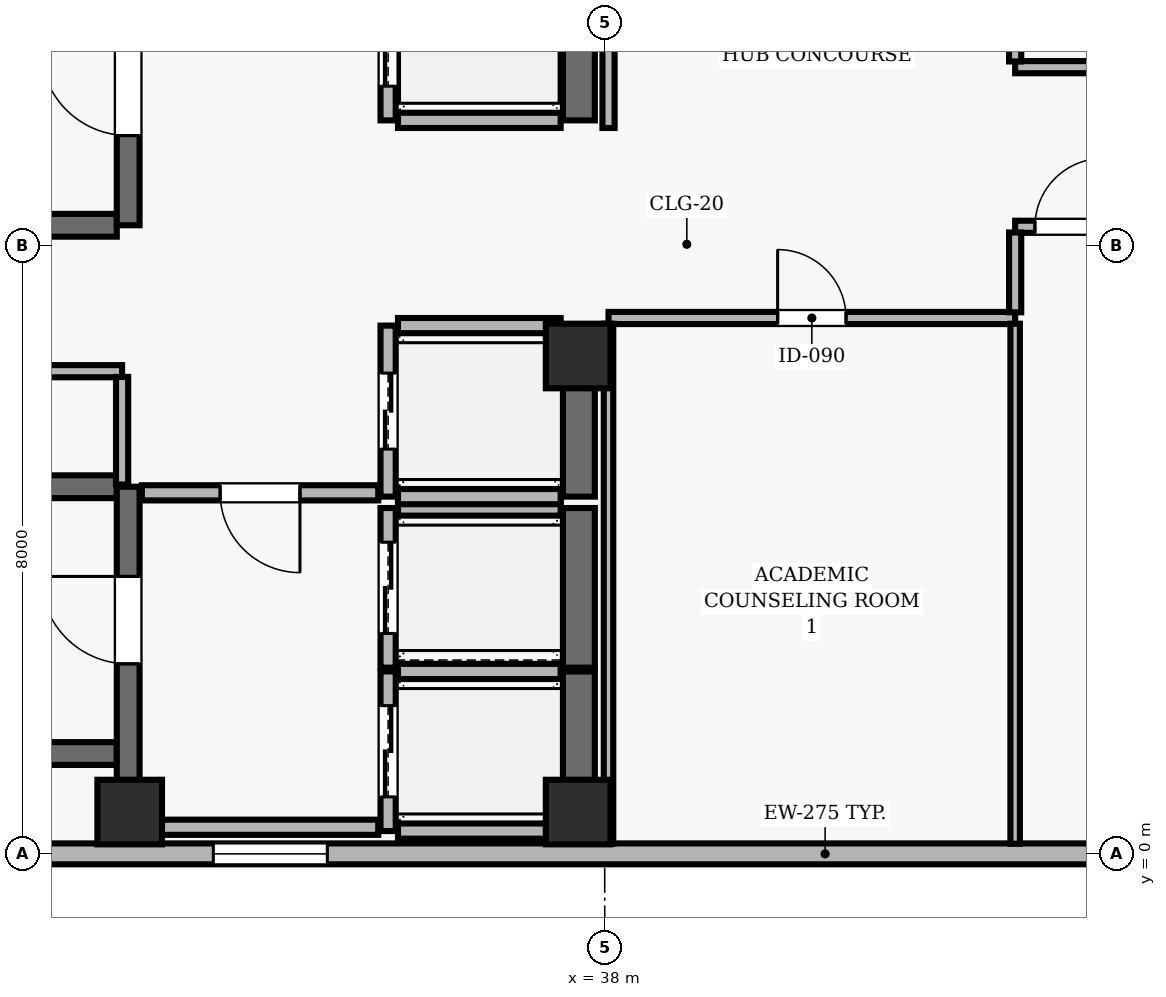
"""IFC4 building model, lengths in metres.
Left out: names, types, materials, properties, quantities, classifications, styles, units other than length and angle.
Written with IfcOpenShell. Run it as: python <this file> out.ifc"""

import sys

from ifc_helpers import new_model, si_unit, direction, frame, frame_2d, origin, origin_2d, place, context, subcontext, project, spatial, rectangle, extrude, element, fill, save


model = new_model("IFC4")
c1 = context("Model", 3, precision=1e-05, world=origin(), true_north=direction((0.0, 1.0)))
c2 = subcontext(c1, "Body", "Model", "MODEL_VIEW")
j1 = project(units=[si_unit("LENGTHUNIT", "METRE"), si_unit("PLANEANGLEUNIT", "RADIAN")], contexts=[c1])
p1 = place(None, origin())
s1 = spatial("IfcSite", under=j1, at=p1, CompositionType="ELEMENT")
p2 = place(p1, origin())
s2 = spatial("IfcBuilding", under=s1, at=p2, CompositionType="ELEMENT")
p3 = place(p2, frame((0.0, 0.0, 298.9)))
s3 = spatial("IfcBuildingStorey", under=s2, at=p3, CompositionType="ELEMENT", Elevation=298.9)
for number, where, z_axis, x_axis in (
    (1, (31.75, 0.55, 0.0), (0.0, 0.0, 1.0), (1.0, 0.0, 0.0)),
    (2, (37.65, 0.55, 0.0), (0.0, 0.0, 1.0), (1.0, 0.0, 0.0)),
    (3, (37.65, 6.55, 0.0), (0.0, 0.0, 1.0), (1.0, 0.0, 0.0)),
):
    element("IfcColumn", number, at=place(p3, frame(where, z_axis=z_axis, x_axis=x_axis)), inside=s3, PredefinedType="COLUMN", context=c2, shape_type="SweptSolid", body=[
        extrude(rectangle(XDim=0.85, YDim=0.85, at=origin_2d()), origin(), (0.0, 0.0, 1.0), 3.9),
    ])
p4 = place(p3, frame((24.5, 0.0, 0.0), z_axis=(0.0, 0.0, 1.0), x_axis=(1.0, 0.0, 0.0)))
e4 = element("IfcWall", 4, at=p4, inside=s3, PredefinedType="SOLIDWALL", context=c2, shape_type="SweptSolid", body=[
    extrude(rectangle(XDim=32.8, YDim=0.275, at=frame_2d((16.4, 0.0))), origin(), (0.0, 0.0, 1.0), 3.69),
])
p5 = place(p4, frame((1.983, 0.0, 0.9)))
e5 = element("IfcOpeningElement", 5, at=p5, cuts=e4, PredefinedType="OPENING", context=c2, shape_type="SweptSolid", body=[
    extrude(rectangle(XDim=1.5, YDim=1.6, at=frame_2d((0.75, 0.8))), frame((0.0, 0.147, 0.0), z_axis=(0.0, -1.0, 0.0), x_axis=(1.0, 0.0, 0.0)), (0.0, 0.0, 1.0), 0.295),
])
p6 = place(p4, frame((8.35, 0.0, 0.9)))
e6 = element("IfcOpeningElement", 6, at=p6, cuts=e4, PredefinedType="OPENING", context=c2, shape_type="SweptSolid", body=[
    extrude(rectangle(XDim=1.5, YDim=1.6, at=frame_2d((0.75, 0.8))), frame((0.0, 0.147, 0.0), z_axis=(0.0, -1.0, 0.0), x_axis=(1.0, 0.0, 0.0)), (0.0, 0.0, 1.0), 0.295),
])
p7 = place(p4, frame((24.75, 0.0, 0.9)))
e7 = element("IfcOpeningElement", 7, at=p7, cuts=e4, PredefinedType="OPENING", context=c2, shape_type="SweptSolid", body=[
    extrude(rectangle(XDim=1.5, YDim=1.6, at=frame_2d((0.75, 0.8))), frame((0.0, 0.147, 0.0), z_axis=(0.0, -1.0, 0.0), x_axis=(1.0, 0.0, 0.0)), (0.0, 0.0, 1.0), 0.295),
])
p8 = place(p4, frame((30.217, 0.0, 0.9)))
e8 = element("IfcOpeningElement", 8, at=p8, cuts=e4, PredefinedType="OPENING", context=c2, shape_type="SweptSolid", body=[
    extrude(rectangle(XDim=1.5, YDim=1.6, at=frame_2d((0.75, 0.8))), frame((0.0, 0.147, 0.0), z_axis=(0.0, -1.0, 0.0), x_axis=(1.0, 0.0, 0.0)), (0.0, 0.0, 1.0), 0.295),
])
for number, where, z_axis, x_axis in (
    (9, (31.58, 4.83, 0.0), (0.0, 0.0, 1.0), (-1.0, 0.0, 0.0)),
    (10, (23.22, 1.32, 0.0), (0.0, 0.0, 1.0), (1.0, 0.0, 0.0)),
):
    element("IfcWall", number, at=place(p3, frame(where, z_axis=z_axis, x_axis=x_axis)), inside=s3, PredefinedType="SHEAR", context=c2, shape_type="SweptSolid", body=[
        extrude(rectangle(XDim=8.36, YDim=0.3, at=frame_2d((4.18, 0.0))), origin(), (0.0, 0.0, 1.0), 3.69),
    ])
p9 = place(p3, frame((31.73, 0.96, 0.0), z_axis=(0.0, 0.0, 1.0), x_axis=(0.0, 1.0, 0.0)))
e11 = element("IfcWall", 11, at=p9, inside=s3, PredefinedType="SHEAR", context=c2, shape_type="SweptSolid", body=[
    extrude(rectangle(XDim=3.87, YDim=0.3, at=frame_2d((1.935, 0.0))), origin(), (0.0, 0.0, 1.0), 3.69),
])
p10 = place(p9, frame((1.54, 0.0, 0.0)))
e12 = element("IfcOpeningElement", 12, at=p10, cuts=e11, PredefinedType="OPENING", context=c2, shape_type="SweptSolid", body=[
    extrude(rectangle(XDim=1.15, YDim=2.15, at=frame_2d((0.575, 1.075))), frame((0.0, 0.16, 0.0), z_axis=(0.0, -1.0, 0.0), x_axis=(1.0, 0.0, 0.0)), (0.0, 0.0, 1.0), 0.32),
])
p11 = place(p3, frame((23.22, 8.27, 0.0), z_axis=(0.0, 0.0, 1.0), x_axis=(1.0, 0.0, 0.0)))
e13 = element("IfcWall", 13, at=p11, inside=s3, PredefinedType="SHEAR", context=c2, shape_type="SweptSolid", body=[
    extrude(rectangle(XDim=8.36, YDim=0.3, at=frame_2d((4.18, 0.0))), origin(), (0.0, 0.0, 1.0), 3.69),
])
p12 = place(p3, frame((31.73, 8.27, 0.0), z_axis=(0.0, 0.0, 1.0), x_axis=(0.0, 1.0, 0.0)))
e14 = element("IfcWall", 14, at=p12, inside=s3, PredefinedType="SHEAR", context=c2, shape_type="SweptSolid", body=[
    extrude(rectangle(XDim=3.51, YDim=0.3, at=frame_2d((1.755, 0.0))), origin(), (0.0, 0.0, 1.0), 3.69),
])
p13 = place(p12, frame((1.18, 0.0, 0.0)))
e15 = element("IfcOpeningElement", 15, at=p13, cuts=e14, PredefinedType="OPENING", context=c2, shape_type="SweptSolid", body=[
    extrude(rectangle(XDim=1.15, YDim=2.15, at=frame_2d((0.575, 1.075))), frame((0.0, 0.16, 0.0), z_axis=(0.0, -1.0, 0.0), x_axis=(1.0, 0.0, 0.0)), (0.0, 0.0, 1.0), 0.32),
])
p14 = place(p3, frame((35.15, 2.4, 0.0), z_axis=(0.0, 0.0, 1.0), x_axis=(0.0, -1.0, 0.0)))
e16 = element("IfcWall", 16, at=p14, inside=s3, PredefinedType="SOLIDWALL", context=c2, shape_type="SweptSolid", body=[
    extrude(rectangle(XDim=2.1, YDim=0.2, at=frame_2d((1.05, 0.0))), origin(), (0.0, 0.0, 1.0), 3.69),
])
p15 = place(p14, frame((0.45, 0.0, 0.0)))
e17 = element("IfcOpeningElement", 17, at=p15, cuts=e16, PredefinedType="OPENING", context=c2, shape_type="SweptSolid", body=[
    extrude(rectangle(XDim=1.2, YDim=2.15, at=frame_2d((0.6, 1.075))), frame((0.0, 0.11, 0.0), z_axis=(0.0, -1.0, 0.0), x_axis=(1.0, 0.0, 0.0)), (0.0, 0.0, 1.0), 0.22),
])
p16 = place(p3, frame((37.66, 0.3, 0.0), z_axis=(0.0, 0.0, 1.0), x_axis=(0.0, 1.0, 0.0)))
e18 = element("IfcWall", 18, at=p16, inside=s3, PredefinedType="SHEAR", context=c2, shape_type="SweptSolid", body=[
    extrude(rectangle(XDim=2.1, YDim=0.42, at=frame_2d((1.05, 0.0))), origin(), (0.0, 0.0, 1.0), 3.69),
])
for number, where, z_axis, x_axis in (
    (19, (35.28, 0.3, 0.0), (0.0, 0.0, 1.0), (1.0, 0.0, 0.0)),
    (20, (37.42, 2.4, 0.0), (0.0, 0.0, 1.0), (-1.0, 0.0, 0.0)),
):
    element("IfcWall", number, at=place(p3, frame(where, z_axis=z_axis, x_axis=x_axis)), inside=s3, PredefinedType="SOLIDWALL", context=c2, shape_type="SweptSolid", body=[
        extrude(rectangle(XDim=2.14, YDim=0.2, at=frame_2d((1.07, 0.0))), origin(), (0.0, 0.0, 1.0), 3.69),
    ])
p17 = place(p3, frame((35.15, 4.55, 0.0), z_axis=(0.0, 0.0, 1.0), x_axis=(0.0, -1.0, 0.0)))
e21 = element("IfcWall", 21, at=p17, inside=s3, PredefinedType="SOLIDWALL", context=c2, shape_type="SweptSolid", body=[
    extrude(rectangle(XDim=2.1, YDim=0.2, at=frame_2d((1.05, 0.0))), origin(), (0.0, 0.0, 1.0), 3.69),
])
p18 = place(p17, frame((0.45, 0.0, 0.0)))
e22 = element("IfcOpeningElement", 22, at=p18, cuts=e21, PredefinedType="OPENING", context=c2, shape_type="SweptSolid", body=[
    extrude(rectangle(XDim=1.2, YDim=2.15, at=frame_2d((0.6, 1.075))), frame((0.0, 0.11, 0.0), z_axis=(0.0, -1.0, 0.0), x_axis=(1.0, 0.0, 0.0)), (0.0, 0.0, 1.0), 0.22),
])
p19 = place(p3, frame((37.66, 2.45, 0.0), z_axis=(0.0, 0.0, 1.0), x_axis=(0.0, 1.0, 0.0)))
e23 = element("IfcWall", 23, at=p19, inside=s3, PredefinedType="SHEAR", context=c2, shape_type="SweptSolid", body=[
    extrude(rectangle(XDim=2.1, YDim=0.42, at=frame_2d((1.05, 0.0))), origin(), (0.0, 0.0, 1.0), 3.69),
])
p20 = place(p3, frame((37.42, 4.55, 0.0), z_axis=(0.0, 0.0, 1.0), x_axis=(-1.0, 0.0, 0.0)))
e24 = element("IfcWall", 24, at=p20, inside=s3, PredefinedType="SOLIDWALL", context=c2, shape_type="SweptSolid", body=[
    extrude(rectangle(XDim=2.14, YDim=0.2, at=frame_2d((1.07, 0.0))), origin(), (0.0, 0.0, 1.0), 3.69),
])
p21 = place(p3, frame((35.15, 6.95, 0.0), z_axis=(0.0, 0.0, 1.0), x_axis=(0.0, -1.0, 0.0)))
e25 = element("IfcWall", 25, at=p21, inside=s3, PredefinedType="SOLIDWALL", context=c2, shape_type="SweptSolid", body=[
    extrude(rectangle(XDim=2.25, YDim=0.2, at=frame_2d((1.125, 0.0))), origin(), (0.0, 0.0, 1.0), 3.69),
])
p22 = place(p21, frame((0.625, 0.0, 0.0)))
e26 = element("IfcOpeningElement", 26, at=p22, cuts=e25, PredefinedType="OPENING", context=c2, shape_type="SweptSolid", body=[
    extrude(rectangle(XDim=1.0, YDim=2.1, at=frame_2d((0.5, 1.05))), frame((0.0, 0.11, 0.0), z_axis=(0.0, -1.0, 0.0), x_axis=(1.0, 0.0, 0.0)), (0.0, 0.0, 1.0), 0.22),
])
p23 = place(p3, frame((37.66, 4.7, 0.0), z_axis=(0.0, 0.0, 1.0), x_axis=(0.0, 1.0, 0.0)))
e27 = element("IfcWall", 27, at=p23, inside=s3, PredefinedType="SHEAR", context=c2, shape_type="SweptSolid", body=[
    extrude(rectangle(XDim=2.25, YDim=0.42, at=frame_2d((1.125, 0.0))), origin(), (0.0, 0.0, 1.0), 3.69),
])
for number, where, z_axis, x_axis in (
    (28, (35.28, 4.7, 0.0), (0.0, 0.0, 1.0), (1.0, 0.0, 0.0)),
    (29, (37.42, 6.95, 0.0), (0.0, 0.0, 1.0), (-1.0, 0.0, 0.0)),
):
    element("IfcWall", number, at=place(p3, frame(where, z_axis=z_axis, x_axis=x_axis)), inside=s3, PredefinedType="SOLIDWALL", context=c2, shape_type="SweptSolid", body=[
        extrude(rectangle(XDim=2.14, YDim=0.2, at=frame_2d((1.07, 0.0))), origin(), (0.0, 0.0, 1.0), 3.69),
    ])
p24 = place(p3, frame((35.15, 11.55, 0.0), z_axis=(0.0, 0.0, 1.0), x_axis=(0.0, -1.0, 0.0)))
e30 = element("IfcWall", 30, at=p24, inside=s3, PredefinedType="SOLIDWALL", context=c2, shape_type="SweptSolid", body=[
    extrude(rectangle(XDim=1.9, YDim=0.2, at=frame_2d((0.95, 0.0))), origin(), (0.0, 0.0, 1.0), 3.69),
])
p25 = place(p24, frame((0.45, 0.0, 0.0)))
e31 = element("IfcOpeningElement", 31, at=p25, cuts=e30, PredefinedType="OPENING", context=c2, shape_type="SweptSolid", body=[
    extrude(rectangle(XDim=1.0, YDim=2.1, at=frame_2d((0.5, 1.05))), frame((0.0, 0.11, 0.0), z_axis=(0.0, -1.0, 0.0), x_axis=(1.0, 0.0, 0.0)), (0.0, 0.0, 1.0), 0.22),
])
p26 = place(p3, frame((37.66, 9.65, 0.0), z_axis=(0.0, 0.0, 1.0), x_axis=(0.0, 1.0, 0.0)))
e32 = element("IfcWall", 32, at=p26, inside=s3, PredefinedType="SHEAR", context=c2, shape_type="SweptSolid", body=[
    extrude(rectangle(XDim=1.9, YDim=0.42, at=frame_2d((0.95, 0.0))), origin(), (0.0, 0.0, 1.0), 3.69),
])
p27 = place(p3, frame((35.28, 9.65, 0.0), z_axis=(0.0, 0.0, 1.0), x_axis=(1.0, 0.0, 0.0)))
e33 = element("IfcWall", 33, at=p27, inside=s3, PredefinedType="SOLIDWALL", context=c2, shape_type="SweptSolid", body=[
    extrude(rectangle(XDim=2.14, YDim=0.2, at=frame_2d((1.07, 0.0))), origin(), (0.0, 0.0, 1.0), 3.69),
])
p28 = place(p3, frame((28.85, 6.35, 0.0), z_axis=(0.0, 0.0, 1.0), x_axis=(1.0, 0.0, 0.0)))
e34 = element("IfcWall", 34, at=p28, inside=s3, PredefinedType="PARTITIONING", context=c2, shape_type="SweptSolid", body=[
    extrude(rectangle(XDim=2.8, YDim=0.16, at=frame_2d((1.4, 0.0))), origin(), (0.0, 0.0, 1.0), 3.69),
])
p29 = place(p28, frame((0.96, 0.0, 0.0)))
e35 = element("IfcOpeningElement", 35, at=p29, cuts=e34, PredefinedType="OPENING", context=c2, shape_type="SweptSolid", body=[
    extrude(rectangle(XDim=0.88, YDim=2.1, at=frame_2d((0.44, 1.05))), frame((0.0, 0.09, 0.0), z_axis=(0.0, -1.0, 0.0), x_axis=(1.0, 0.0, 0.0)), (0.0, 0.0, 1.0), 0.18),
])
p30 = place(p3, frame((31.65, 0.35, 0.0), z_axis=(0.0, 0.0, 1.0), x_axis=(1.0, 0.0, 0.0)))
e36 = element("IfcWall", 36, at=p30, inside=s3, PredefinedType="SOLIDWALL", context=c2, shape_type="SweptSolid", body=[
    extrude(rectangle(XDim=3.37, YDim=0.2, at=frame_2d((1.685, 0.0))), origin(), (0.0, 0.0, 1.0), 3.69),
])
p31 = place(p3, frame((35.02, 4.75, 0.0), z_axis=(0.0, 0.0, 1.0), x_axis=(-1.0, 0.0, 0.0)))
e37 = element("IfcWall", 37, at=p31, inside=s3, PredefinedType="SOLIDWALL", context=c2, shape_type="SweptSolid", body=[
    extrude(rectangle(XDim=3.11, YDim=0.2, at=frame_2d((1.555, 0.0))), origin(), (0.0, 0.0, 1.0), 3.69),
])
p32 = place(p31, frame((1.03, 0.0, 0.0)))
e38 = element("IfcOpeningElement", 38, at=p32, cuts=e37, PredefinedType="OPENING", context=c2, shape_type="SweptSolid", body=[
    extrude(rectangle(XDim=1.05, YDim=2.15, at=frame_2d((0.525, 1.075))), frame((0.0, 0.11, 0.0), z_axis=(0.0, -1.0, 0.0), x_axis=(1.0, 0.0, 0.0)), (0.0, 0.0, 1.0), 0.22),
])
p33 = place(p3, frame((38.05, 7.05, 0.0), z_axis=(0.0, 0.0, 1.0), x_axis=(1.0, 0.0, 0.0)))
e39 = element("IfcWall", 39, at=p33, inside=s3, PredefinedType="PARTITIONING", context=c2, shape_type="SweptSolid", body=[
    extrude(rectangle(XDim=5.35, YDim=0.16, at=frame_2d((2.675, 0.0))), origin(), (0.0, 0.0, 1.0), 3.69),
])
p34 = place(p33, frame((2.225, 0.0, 0.0)))
e40 = element("IfcOpeningElement", 40, at=p34, cuts=e39, PredefinedType="OPENING", context=c2, shape_type="SweptSolid", body=[
    extrude(rectangle(XDim=0.9, YDim=2.1, at=frame_2d((0.45, 1.05))), frame((0.0, 0.09, 0.0), z_axis=(0.0, -1.0, 0.0), x_axis=(1.0, 0.0, 0.0)), (0.0, 0.0, 1.0), 0.18),
])
p35 = place(p3, frame((43.4, 8.25, 0.0), z_axis=(0.0, 0.0, 1.0), x_axis=(1.0, 0.0, 0.0)))
e41 = element("IfcWall", 41, at=p35, inside=s3, PredefinedType="PARTITIONING", context=c2, shape_type="SweptSolid", body=[
    extrude(rectangle(XDim=4.92, YDim=0.16, at=frame_2d((2.46, 0.0))), origin(), (0.0, 0.0, 1.0), 3.227),
])
p36 = place(p35, frame((0.26, 0.0, 0.0)))
e42 = element("IfcOpeningElement", 42, at=p36, cuts=e41, PredefinedType="OPENING", context=c2, shape_type="SweptSolid", body=[
    extrude(rectangle(XDim=0.9, YDim=2.1, at=frame_2d((0.45, 1.05))), frame((0.0, 0.09, 0.0), z_axis=(0.0, -1.0, 0.0), x_axis=(1.0, 0.0, 0.0)), (0.0, 0.0, 1.0), 0.18),
])
p37 = place(p3, frame((48.32, 10.35, 0.0), z_axis=(0.0, 0.0, 1.0), x_axis=(-1.0, 0.0, 0.0)))
e43 = element("IfcWall", 43, at=p37, inside=s3, PredefinedType="PARTITIONING", context=c2, shape_type="SweptSolid", body=[
    extrude(rectangle(XDim=4.92, YDim=0.16, at=frame_2d((2.46, 0.0))), origin(), (0.0, 0.0, 1.0), 3.424),
])
p38 = place(p3, frame((31.65, 4.86, 0.0), z_axis=(0.0, 0.0, 1.0), x_axis=(0.0, 1.0, 0.0)))
e44 = element("IfcWall", 44, at=p38, inside=s3, PredefinedType="PARTITIONING", context=c2, shape_type="SweptSolid", body=[
    extrude(rectangle(XDim=1.415, YDim=0.16, at=frame_2d((0.708, 0.0))), origin(), (0.0, 0.0, 1.0), 3.69),
])
p39 = place(p3, frame((38.05, 6.975, 0.0), z_axis=(0.0, 0.0, 1.0), x_axis=(0.0, -1.0, 0.0)))
e45 = element("IfcWall", 45, at=p39, inside=s3, PredefinedType="PARTITIONING", context=c2, shape_type="SweptSolid", body=[
    extrude(rectangle(XDim=6.842, YDim=0.125, at=frame_2d((3.421, 0.0))), origin(), (0.0, 0.0, 1.0), 3.227),
])
p40 = place(p3, frame((38.05, 15.925, 0.0), z_axis=(0.0, 0.0, 1.0), x_axis=(0.0, -1.0, 0.0)))
e46 = element("IfcWall", 46, at=p40, inside=s3, PredefinedType="PARTITIONING", context=c2, shape_type="SweptSolid", body=[
    extrude(rectangle(XDim=6.375, YDim=0.16, at=frame_2d((3.188, 0.0))), origin(), (0.0, 0.0, 1.0), 3.227),
])
p41 = place(p3, frame((43.4, 0.133, 0.0), z_axis=(0.0, 0.0, 1.0), x_axis=(0.0, 1.0, 0.0)))
e47 = element("IfcWall", 47, at=p41, inside=s3, PredefinedType="PARTITIONING", context=c2, shape_type="SweptSolid", body=[
    extrude(rectangle(XDim=6.842, YDim=0.125, at=frame_2d((3.421, 0.0))), origin(), (0.0, 0.0, 1.0), 3.69),
])
p42 = place(p3, frame((43.4, 7.125, 0.0), z_axis=(0.0, 0.0, 1.0), x_axis=(0.0, 1.0, 0.0)))
e48 = element("IfcWall", 48, at=p42, inside=s3, PredefinedType="PARTITIONING", context=c2, shape_type="SweptSolid", body=[
    extrude(rectangle(XDim=1.05, YDim=0.16, at=frame_2d((0.525, 0.0))), origin(), (0.0, 0.0, 1.0), 3.69),
])
p43 = place(p3, frame((43.4, 10.425, 0.0), z_axis=(0.0, 0.0, 1.0), x_axis=(0.0, 1.0, 0.0)))
e49 = element("IfcWall", 49, at=p43, inside=s3, PredefinedType="PARTITIONING", context=c2, shape_type="SweptSolid", body=[
    extrude(rectangle(XDim=5.5, YDim=0.16, at=frame_2d((2.75, 0.0))), origin(), (0.0, 0.0, 1.0), 3.69),
])
p44 = place(p43, frame((2.3, 0.0, 0.0)))
e50 = element("IfcOpeningElement", 50, at=p44, cuts=e49, PredefinedType="OPENING", context=c2, shape_type="SweptSolid", body=[
    extrude(rectangle(XDim=0.9, YDim=2.1, at=frame_2d((0.45, 1.05))), frame((0.0, 0.09, 0.0), z_axis=(0.0, -1.0, 0.0), x_axis=(1.0, 0.0, 0.0)), (0.0, 0.0, 1.0), 0.18),
])
p45 = place(p6, origin())
e51 = element("IfcWindow", 51, at=p45, inside=s3, PartitioningType="SINGLE_PANEL", PredefinedType="WINDOW", context=c2, shape_type="SweptSolid", body=[
    extrude(rectangle(XDim=1.5, YDim=1.6, at=frame_2d((0.75, 0.8))), frame((0.0, 0.03, 0.0), z_axis=(0.0, -1.0, 0.0), x_axis=(1.0, 0.0, 0.0)), (0.0, 0.0, 1.0), 0.06),
])
fill(e6, e51)
p46 = place(p10, origin())
e52 = element("IfcDoor", 52, at=p46, inside=s3, OperationType="SINGLE_SWING_RIGHT", PredefinedType="DOOR", context=c2, shape_type="SweptSolid", body=[
    extrude(rectangle(XDim=1.15, YDim=2.15, at=frame_2d((0.575, 1.075))), frame((0.0, 0.025, 0.0), z_axis=(0.0, -1.0, 0.0), x_axis=(1.0, 0.0, 0.0)), (0.0, 0.0, 1.0), 0.05),
])
fill(e12, e52)
p47 = place(p13, origin())
e53 = element("IfcDoor", 53, at=p47, inside=s3, OperationType="SINGLE_SWING_RIGHT", PredefinedType="DOOR", context=c2, shape_type="SweptSolid", body=[
    extrude(rectangle(XDim=1.15, YDim=2.15, at=frame_2d((0.575, 1.075))), frame((0.0, 0.025, 0.0), z_axis=(0.0, -1.0, 0.0), x_axis=(1.0, 0.0, 0.0)), (0.0, 0.0, 1.0), 0.05),
])
fill(e15, e53)
p48 = place(p15, origin())
e54 = element("IfcDoor", 54, at=p48, inside=s3, OperationType="DOUBLE_DOOR_SLIDING", PredefinedType="DOOR", context=c2, shape_type="SweptSolid", body=[
    extrude(rectangle(XDim=1.2, YDim=2.15, at=frame_2d((0.6, 1.075))), frame((0.0, 0.025, 0.0), z_axis=(0.0, -1.0, 0.0), x_axis=(1.0, 0.0, 0.0)), (0.0, 0.0, 1.0), 0.05),
])
fill(e17, e54)
p49 = place(p18, origin())
e55 = element("IfcDoor", 55, at=p49, inside=s3, OperationType="DOUBLE_DOOR_SLIDING", PredefinedType="DOOR", context=c2, shape_type="SweptSolid", body=[
    extrude(rectangle(XDim=1.2, YDim=2.15, at=frame_2d((0.6, 1.075))), frame((0.0, 0.025, 0.0), z_axis=(0.0, -1.0, 0.0), x_axis=(1.0, 0.0, 0.0)), (0.0, 0.0, 1.0), 0.05),
])
fill(e22, e55)
p50 = place(p22, origin())
e56 = element("IfcDoor", 56, at=p50, inside=s3, OperationType="DOUBLE_DOOR_SLIDING", PredefinedType="DOOR", context=c2, shape_type="SweptSolid", body=[
    extrude(rectangle(XDim=1.0, YDim=2.1, at=frame_2d((0.5, 1.05))), frame((0.0, 0.025, 0.0), z_axis=(0.0, -1.0, 0.0), x_axis=(1.0, 0.0, 0.0)), (0.0, 0.0, 1.0), 0.05),
])
fill(e26, e56)
p51 = place(p25, origin())
e57 = element("IfcDoor", 57, at=p51, inside=s3, OperationType="DOUBLE_DOOR_SLIDING", PredefinedType="DOOR", context=c2, shape_type="SweptSolid", body=[
    extrude(rectangle(XDim=1.0, YDim=2.1, at=frame_2d((0.5, 1.05))), frame((0.0, 0.025, 0.0), z_axis=(0.0, -1.0, 0.0), x_axis=(1.0, 0.0, 0.0)), (0.0, 0.0, 1.0), 0.05),
])
fill(e31, e57)
p52 = place(p32, origin())
e58 = element("IfcDoor", 58, at=p52, inside=s3, OperationType="SINGLE_SWING_LEFT", PredefinedType="DOOR", context=c2, shape_type="SweptSolid", body=[
    extrude(rectangle(XDim=1.05, YDim=2.15, at=frame_2d((0.525, 1.075))), frame((0.0, 0.025, 0.0), z_axis=(0.0, -1.0, 0.0), x_axis=(1.0, 0.0, 0.0)), (0.0, 0.0, 1.0), 0.05),
])
fill(e38, e58)
p53 = place(p34, origin())
e59 = element("IfcDoor", 59, at=p53, inside=s3, OperationType="SINGLE_SWING_LEFT", PredefinedType="DOOR", context=c2, shape_type="SweptSolid", body=[
    extrude(rectangle(XDim=0.9, YDim=2.1, at=frame_2d((0.45, 1.05))), frame((0.0, 0.025, 0.0), z_axis=(0.0, -1.0, 0.0), x_axis=(1.0, 0.0, 0.0)), (0.0, 0.0, 1.0), 0.05),
])
fill(e40, e59)
p54 = place(p36, origin())
e60 = element("IfcDoor", 60, at=p54, inside=s3, OperationType="SINGLE_SWING_RIGHT", PredefinedType="DOOR", context=c2, shape_type="SweptSolid", body=[
    extrude(rectangle(XDim=0.9, YDim=2.1, at=frame_2d((0.45, 1.05))), frame((0.0, 0.025, 0.0), z_axis=(0.0, -1.0, 0.0), x_axis=(1.0, 0.0, 0.0)), (0.0, 0.0, 1.0), 0.05),
])
fill(e42, e60)
save(model, sys.argv[1])
